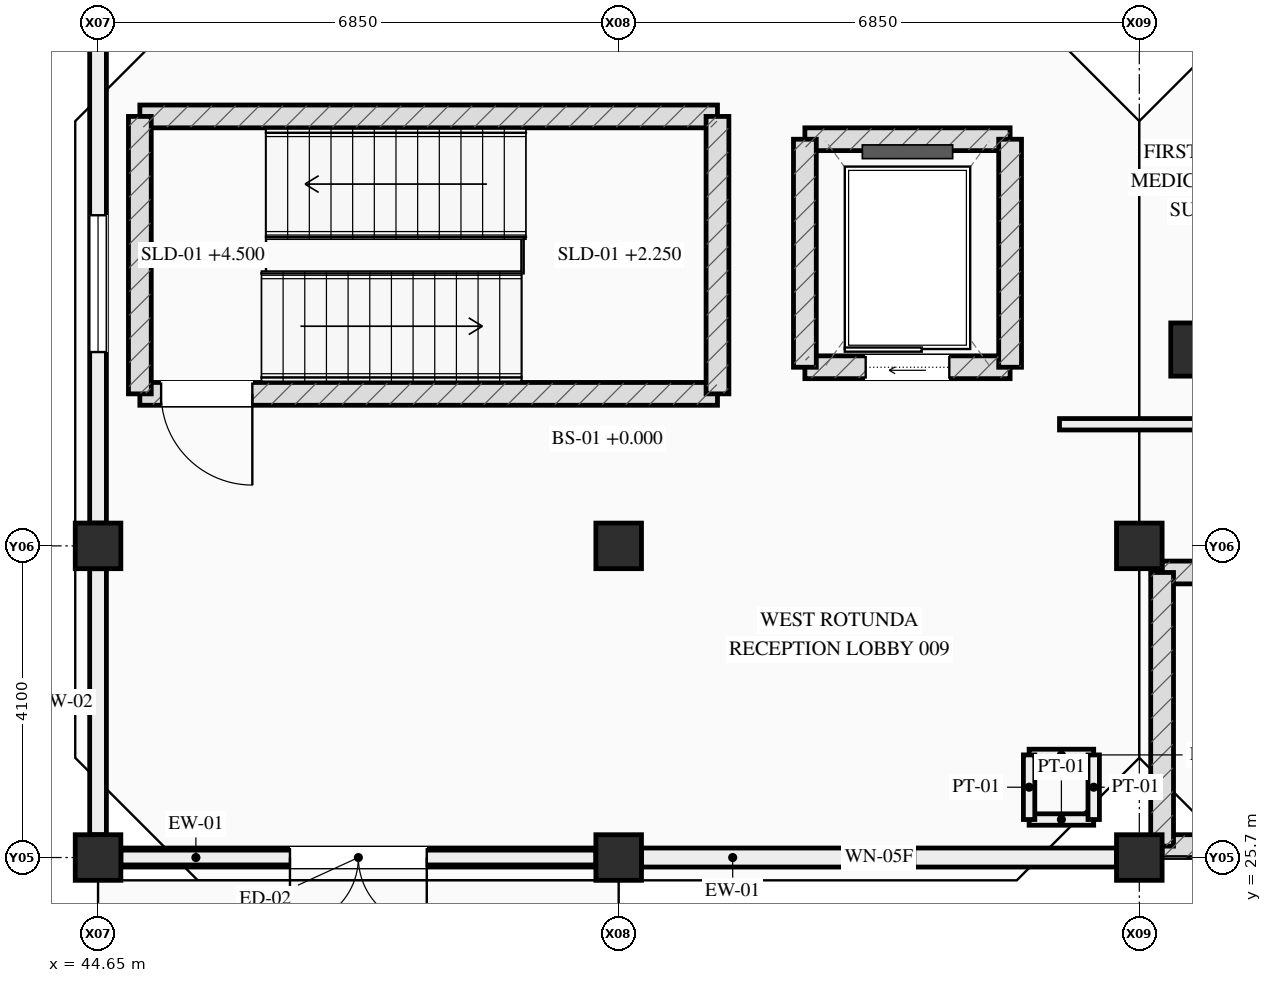
"""IFC4 building model, lengths in metres.
Left out: names, types, materials, properties, quantities, classifications, styles, units other than length and angle.
Written with IfcOpenShell. Run it as: python <this file> out.ifc"""

import sys

from ifc_helpers import new_model, si_unit, direction, frame, frame_2d, origin, origin_2d, place, context, subcontext, project, spatial, rectangle, circle, extrude, element, fill, save


model = new_model("IFC4")
c1 = context("Model", 3, precision=1e-05, world=origin(), true_north=direction((0.0, 1.0)))
c2 = subcontext(c1, "Body", "Model", "MODEL_VIEW")
j1 = project(units=[si_unit("LENGTHUNIT", "METRE"), si_unit("PLANEANGLEUNIT", "RADIAN")], contexts=[c1])
p1 = place(None, origin())
s1 = spatial("IfcSite", under=j1, at=p1, CompositionType="ELEMENT")
p2 = place(p1, origin())
s2 = spatial("IfcBuilding", under=s1, at=p2, CompositionType="ELEMENT")
p3 = place(p2, origin())
s3 = spatial("IfcBuildingStorey", under=s2, at=p3, CompositionType="ELEMENT", Elevation=0.0)
for number, where, z_axis, x_axis in (
    (1, (44.65, 25.7, 0.0), (0.0, 0.0, 1.0), (1.0, 0.0, 0.0)),
    (2, (44.65, 29.8, 0.0), (0.0, 0.0, 1.0), (1.0, 0.0, 0.0)),
    (3, (51.5, 25.7, 0.0), (0.0, 0.0, 1.0), (1.0, 0.0, 0.0)),
    (4, (51.5, 29.8, 0.0), (0.0, 0.0, 1.0), (1.0, 0.0, 0.0)),
    (5, (58.35, 25.7, 0.0), (0.0, 0.0, 1.0), (1.0, 0.0, 0.0)),
    (6, (58.35, 29.8, 0.0), (0.0, 0.0, 1.0), (1.0, 0.0, 0.0)),
):
    element("IfcColumn", number, at=place(p3, frame(where, z_axis=z_axis, x_axis=x_axis)), inside=s3, PredefinedType="COLUMN", context=c2, shape_type="SweptSolid", body=[
        extrude(rectangle(XDim=0.6, YDim=0.6, at=origin_2d()), origin(), (0.0, 0.0, 1.0), 4.5),
    ])
p4 = place(p3, frame((59.114, 32.383, 0.0), z_axis=(0.0, 0.0, 1.0), x_axis=(1.0, 0.0, 0.0)))
e7 = element("IfcColumn", 7, at=p4, inside=s3, PredefinedType="COLUMN", context=c2, shape_type="SweptSolid", body=[
    extrude(circle(Radius=0.35, at=origin_2d()), origin(), (0.0, 0.0, 1.0), 4.5),
])
p5 = place(p3, frame((51.2, 25.7, 0.0), z_axis=(0.0, 0.0, 1.0), x_axis=(-1.0, 0.0, 0.0)))
e8 = element("IfcWall", 8, at=p5, inside=s3, PredefinedType="STANDARD", context=c2, shape_type="SweptSolid", body=[
    extrude(rectangle(XDim=6.25, YDim=0.25, at=frame_2d((3.125, 0.0))), origin(), (0.0, 0.0, 1.0), 2.985),
])
p6 = place(p5, frame((2.225, 0.0, 0.0)))
e9 = element("IfcOpeningElement", 9, at=p6, cuts=e8, PredefinedType="OPENING", context=c2, shape_type="SweptSolid", body=[
    extrude(rectangle(XDim=1.8, YDim=2.25, at=frame_2d((0.9, 1.125))), frame((0.0, 0.135, 0.0), z_axis=(0.0, -1.0, 0.0), x_axis=(1.0, 0.0, 0.0)), (0.0, 0.0, 1.0), 0.27),
])
p7 = place(p3, frame((51.2, 25.7, 3.35), z_axis=(0.0, 0.0, 1.0), x_axis=(-1.0, 0.0, 0.0)))
e10 = element("IfcWall", 10, at=p7, inside=s3, PredefinedType="STANDARD", context=c2, shape_type="SweptSolid", body=[
    extrude(rectangle(XDim=6.25, YDim=0.195, at=frame_2d((3.125, 0.0))), origin(), (0.0, 0.0, 1.0), 0.23),
])
p8 = place(p3, frame((58.05, 25.7, 0.0), z_axis=(0.0, 0.0, 1.0), x_axis=(-1.0, 0.0, 0.0)))
e11 = element("IfcWall", 11, at=p8, inside=s3, PredefinedType="STANDARD", context=c2, shape_type="SweptSolid", body=[
    extrude(rectangle(XDim=6.25, YDim=0.25, at=frame_2d((3.125, 0.0))), origin(), (0.0, 0.0, 1.0), 3.58),
])
p9 = place(p8, frame((2.65, 0.0, 1.08)))
e12 = element("IfcOpeningElement", 12, at=p9, cuts=e11, PredefinedType="OPENING", context=c2, shape_type="SweptSolid", body=[
    extrude(rectangle(XDim=0.95, YDim=1.05, at=frame_2d((0.475, 0.525))), frame((0.0, 0.135, 0.0), z_axis=(0.0, -1.0, 0.0), x_axis=(1.0, 0.0, 0.0)), (0.0, 0.0, 1.0), 0.27),
])
p10 = place(p3, frame((44.65, 26.0, 0.0), z_axis=(0.0, 0.0, 1.0), x_axis=(0.0, 1.0, 0.0)))
e13 = element("IfcWall", 13, at=p10, inside=s3, PredefinedType="STANDARD", context=c2, shape_type="SweptSolid", body=[
    extrude(rectangle(XDim=3.5, YDim=0.22, at=frame_2d((1.75, 0.0))), origin(), (0.0, 0.0, 1.0), 3.58),
])
p11 = place(p3, frame((44.65, 30.1, 0.0), z_axis=(0.0, 0.0, 1.0), x_axis=(0.0, 1.0, 0.0)))
e14 = element("IfcWall", 14, at=p11, inside=s3, PredefinedType="STANDARD", context=c2, shape_type="SweptSolid", body=[
    extrude(rectangle(XDim=6.3, YDim=0.22, at=frame_2d((3.15, 0.0))), origin(), (0.0, 0.0, 1.0), 3.58),
])
p12 = place(p11, frame((2.25, 0.0, 0.88)))
e15 = element("IfcOpeningElement", 15, at=p12, cuts=e14, PredefinedType="OPENING", context=c2, shape_type="SweptSolid", body=[
    extrude(rectangle(XDim=1.8, YDim=1.45, at=frame_2d((0.9, 0.725))), frame((0.0, 0.12, 0.0), z_axis=(0.0, -1.0, 0.0), x_axis=(1.0, 0.0, 0.0)), (0.0, 0.0, 1.0), 0.24),
])
for number, where, z_axis, x_axis in (
    (16, (56.9, 26.2, 0.0), (0.0, 0.0, 1.0), (1.0, 0.0, 0.0)),
    (17, (56.9, 27.05, 0.0), (0.0, 0.0, 1.0), (1.0, 0.0, 0.0)),
    (18, (56.9, 26.2, 0.0), (0.0, 0.0, 1.0), (0.0, 1.0, 0.0)),
    (19, (57.75, 26.2, 0.0), (0.0, 0.0, 1.0), (0.0, 1.0, 0.0)),
):
    element("IfcWall", number, at=place(p3, frame(where, z_axis=z_axis, x_axis=x_axis)), inside=s3, PredefinedType="PARTITIONING", context=c2, shape_type="SweptSolid", body=[
        extrude(rectangle(XDim=0.85, YDim=0.15, at=frame_2d((0.425, 0.0))), origin(), (0.0, 0.0, 1.0), 3.3),
    ])
p13 = place(p3, frame((52.8, 31.8, 0.0), z_axis=(0.0, 0.0, 1.0), x_axis=(-1.0, 0.0, 0.0)))
e20 = element("IfcWall", 20, at=p13, inside=s3, PredefinedType="SHEAR", context=c2, shape_type="SweptSolid", body=[
    extrude(rectangle(XDim=7.6, YDim=0.3, at=frame_2d((3.8, 0.0))), origin(), (0.0, 0.0, 1.0), 4.26),
])
p14 = place(p13, frame((6.12, 0.0, 0.0)))
e21 = element("IfcOpeningElement", 21, at=p14, cuts=e20, PredefinedType="OPENING", context=c2, shape_type="SweptSolid", body=[
    extrude(rectangle(XDim=1.2, YDim=2.2, at=frame_2d((0.6, 1.1))), frame((0.0, 0.16, 0.0), z_axis=(0.0, -1.0, 0.0), x_axis=(1.0, 0.0, 0.0)), (0.0, 0.0, 1.0), 0.32),
])
p15 = place(p3, frame((45.2, 35.45, 0.0), z_axis=(0.0, 0.0, 1.0), x_axis=(1.0, 0.0, 0.0)))
e22 = element("IfcWall", 22, at=p15, inside=s3, PredefinedType="SHEAR", context=c2, shape_type="SweptSolid", body=[
    extrude(rectangle(XDim=7.6, YDim=0.3, at=frame_2d((3.8, 0.0))), origin(), (0.0, 0.0, 1.0), 4.26),
])
for number, where, z_axis, x_axis in (
    (23, (45.2, 31.8, 0.0), (0.0, 0.0, 1.0), (0.0, 1.0, 0.0)),
    (24, (52.8, 35.45, 0.0), (0.0, 0.0, 1.0), (0.0, -1.0, 0.0)),
):
    element("IfcWall", number, at=place(p3, frame(where, z_axis=z_axis, x_axis=x_axis)), inside=s3, PredefinedType="SHEAR", context=c2, shape_type="SweptSolid", body=[
        extrude(rectangle(XDim=3.65, YDim=0.3, at=frame_2d((1.825, 0.0))), origin(), (0.0, 0.0, 1.0), 4.26),
    ])
p16 = place(p3, frame((53.95, 32.15, 0.0), z_axis=(0.0, 0.0, 1.0), x_axis=(1.0, 0.0, 0.0)))
e25 = element("IfcWall", 25, at=p16, inside=s3, PredefinedType="SHEAR", context=c2, shape_type="SweptSolid", body=[
    extrude(rectangle(XDim=2.7, YDim=0.3, at=frame_2d((1.35, 0.0))), origin(), (0.0, 0.0, 1.0), 4.26),
])
p17 = place(p16, frame((0.8, 0.0, 0.0)))
e26 = element("IfcOpeningElement", 26, at=p17, cuts=e25, PredefinedType="OPENING", context=c2, shape_type="SweptSolid", body=[
    extrude(rectangle(XDim=1.1, YDim=2.2, at=frame_2d((0.55, 1.1))), frame((0.0, 0.16, 0.0), z_axis=(0.0, -1.0, 0.0), x_axis=(1.0, 0.0, 0.0)), (0.0, 0.0, 1.0), 0.32),
])
p18 = place(p3, frame((53.95, 35.15, 0.0), z_axis=(0.0, 0.0, 1.0), x_axis=(1.0, 0.0, 0.0)))
e27 = element("IfcWall", 27, at=p18, inside=s3, PredefinedType="SHEAR", context=c2, shape_type="SweptSolid", body=[
    extrude(rectangle(XDim=2.7, YDim=0.3, at=frame_2d((1.35, 0.0))), origin(), (0.0, 0.0, 1.0), 4.26),
])
for number, where, z_axis, x_axis in (
    (28, (53.95, 32.15, 0.0), (0.0, 0.0, 1.0), (0.0, 1.0, 0.0)),
    (29, (56.65, 32.15, 0.0), (0.0, 0.0, 1.0), (0.0, 1.0, 0.0)),
):
    element("IfcWall", number, at=place(p3, frame(where, z_axis=z_axis, x_axis=x_axis)), inside=s3, PredefinedType="SHEAR", context=c2, shape_type="SweptSolid", body=[
        extrude(rectangle(XDim=3.0, YDim=0.3, at=frame_2d((1.5, 0.0))), origin(), (0.0, 0.0, 1.0), 4.26),
    ])
for number, where, z_axis, x_axis in (
    (30, (58.65, 25.85, 0.0), (0.0, 0.0, 1.0), (1.0, 0.0, 0.0)),
    (31, (58.65, 29.45, 0.0), (0.0, 0.0, 1.0), (1.0, 0.0, 0.0)),
):
    element("IfcWall", number, at=place(p3, frame(where, z_axis=z_axis, x_axis=x_axis)), inside=s3, PredefinedType="SHEAR", context=c2, shape_type="SweptSolid", body=[
        extrude(rectangle(XDim=6.4, YDim=0.3, at=frame_2d((3.2, 0.0))), origin(), (0.0, 0.0, 1.0), 4.26),
    ])
p19 = place(p3, frame((58.65, 25.85, 0.0), z_axis=(0.0, 0.0, 1.0), x_axis=(0.0, 1.0, 0.0)))
e32 = element("IfcWall", 32, at=p19, inside=s3, PredefinedType="SHEAR", context=c2, shape_type="SweptSolid", body=[
    extrude(rectangle(XDim=3.6, YDim=0.3, at=frame_2d((1.8, 0.0))), origin(), (0.0, 0.0, 1.0), 4.26),
])
p20 = place(p3, frame((57.3, 31.4, 0.0), z_axis=(0.0, 0.0, 1.0), x_axis=(1.0, 0.0, 0.0)))
e33 = element("IfcWall", 33, at=p20, inside=s3, PredefinedType="PARTITIONING", context=c2, shape_type="SweptSolid", body=[
    extrude(rectangle(XDim=4.6, YDim=0.15, at=frame_2d((2.3, 0.0))), origin(), (0.0, 0.0, 1.0), 3.3),
])
p21 = place(p6, origin())
e34 = element("IfcDoor", 34, at=p21, inside=s3, OperationType="DOUBLE_DOOR_SINGLE_SWING", PredefinedType="DOOR", context=c2, shape_type="SweptSolid", body=[
    extrude(rectangle(XDim=1.8, YDim=2.25, at=frame_2d((0.9, 1.125))), frame((0.0, 0.025, 0.0), z_axis=(0.0, -1.0, 0.0), x_axis=(1.0, 0.0, 0.0)), (0.0, 0.0, 1.0), 0.05),
])
fill(e9, e34)
p22 = place(p9, origin())
e35 = element("IfcWindow", 35, at=p22, inside=s3, PartitioningType="SINGLE_PANEL", PredefinedType="WINDOW", context=c2, shape_type="SweptSolid", body=[
    extrude(rectangle(XDim=0.95, YDim=1.05, at=frame_2d((0.475, 0.525))), frame((0.0, 0.03, 0.0), z_axis=(0.0, -1.0, 0.0), x_axis=(1.0, 0.0, 0.0)), (0.0, 0.0, 1.0), 0.06),
])
fill(e12, e35)
p23 = place(p12, origin())
e36 = element("IfcWindow", 36, at=p23, inside=s3, PartitioningType="SINGLE_PANEL", PredefinedType="WINDOW", context=c2, shape_type="SweptSolid", body=[
    extrude(rectangle(XDim=1.8, YDim=1.45, at=frame_2d((0.9, 0.725))), frame((0.0, 0.03, 0.0), z_axis=(0.0, -1.0, 0.0), x_axis=(1.0, 0.0, 0.0)), (0.0, 0.0, 1.0), 0.06),
])
fill(e15, e36)
p24 = place(p14, origin())
e37 = element("IfcDoor", 37, at=p24, inside=s3, OperationType="SINGLE_SWING_LEFT", PredefinedType="DOOR", context=c2, shape_type="SweptSolid", body=[
    extrude(rectangle(XDim=1.2, YDim=2.2, at=frame_2d((0.6, 1.1))), frame((0.0, 0.025, 0.0), z_axis=(0.0, -1.0, 0.0), x_axis=(1.0, 0.0, 0.0)), (0.0, 0.0, 1.0), 0.05),
])
fill(e21, e37)
p25 = place(p17, origin())
e38 = element("IfcDoor", 38, at=p25, inside=s3, OperationType="SLIDING_TO_LEFT", PredefinedType="DOOR", context=c2, shape_type="SweptSolid", body=[
    extrude(rectangle(XDim=1.1, YDim=2.2, at=frame_2d((0.55, 1.1))), frame((0.0, 0.025, 0.0), z_axis=(0.0, -1.0, 0.0), x_axis=(1.0, 0.0, 0.0)), (0.0, 0.0, 1.0), 0.05),
])
fill(e26, e38)
save(model, sys.argv[1])
